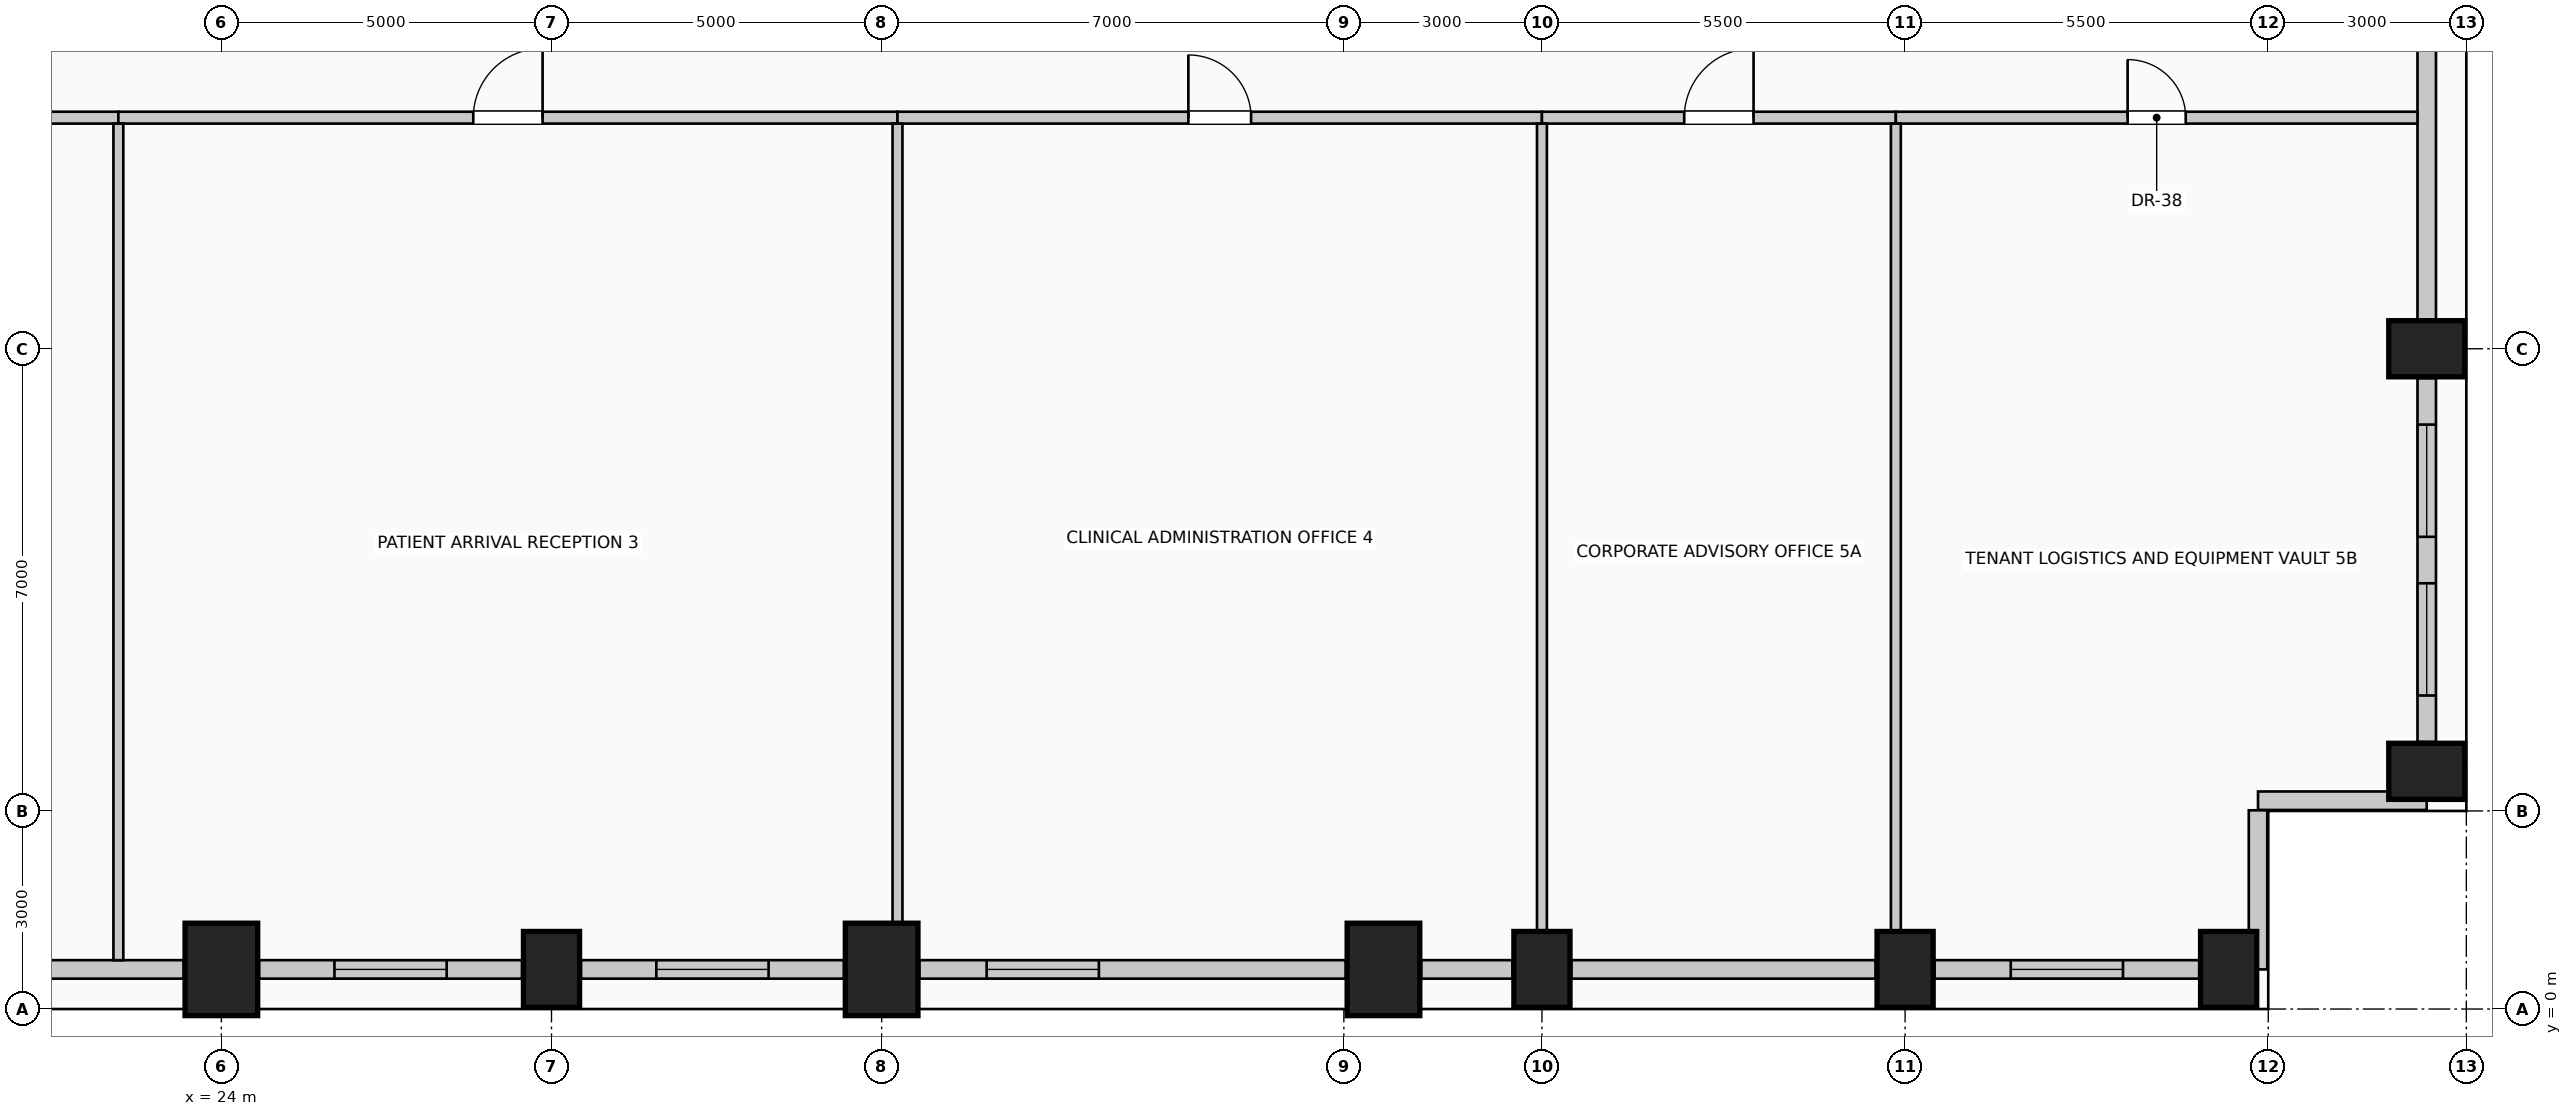
"""IFC4 building model, lengths in metres.
Left out: names, types, materials, properties, quantities, classifications, styles, units other than length and angle.
Written with IfcOpenShell. Run it as: python <this file> out.ifc"""

import sys

from ifc_helpers import new_model, si_unit, direction, frame, frame_2d, origin, origin_2d, place, context, subcontext, project, spatial, rectangle, extrude, element, fill, save


model = new_model("IFC4")
c1 = context("Model", 3, precision=1e-05, world=origin(), true_north=direction((0.0, 1.0)))
c2 = subcontext(c1, "Body", "Model", "MODEL_VIEW")
j1 = project(units=[si_unit("LENGTHUNIT", "METRE"), si_unit("PLANEANGLEUNIT", "RADIAN")], contexts=[c1])
p1 = place(None, origin())
s1 = spatial("IfcSite", under=j1, at=p1, CompositionType="ELEMENT")
p2 = place(p1, origin())
s2 = spatial("IfcBuilding", under=s1, at=p2, CompositionType="ELEMENT")
p3 = place(p2, frame((0.0, 0.0, 128.6)))
s3 = spatial("IfcBuildingStorey", under=s2, at=p3, CompositionType="ELEMENT", Elevation=128.6)
p4 = place(p3, frame((24.0, 0.6, 0.0), z_axis=(0.0, 0.0, 1.0), x_axis=(1.0, 0.0, 0.0)))
e1 = element("IfcColumn", 1, at=p4, inside=s3, PredefinedType="COLUMN", context=c2, shape_type="SweptSolid", body=[
    extrude(rectangle(XDim=1.1, YDim=1.4, at=origin_2d()), origin(), (0.0, 0.0, 1.0), 4.0),
])
p5 = place(p3, frame((29.0, 0.6, 0.0), z_axis=(0.0, 0.0, 1.0), x_axis=(1.0, 0.0, 0.0)))
e2 = element("IfcColumn", 2, at=p5, inside=s3, PredefinedType="COLUMN", context=c2, shape_type="SweptSolid", body=[
    extrude(rectangle(XDim=0.85, YDim=1.15, at=origin_2d()), origin(), (0.0, 0.0, 1.0), 4.0),
])
for number, where, z_axis, x_axis in (
    (3, (34.0, 0.6, 0.0), (0.0, 0.0, 1.0), (1.0, 0.0, 0.0)),
    (4, (41.6, 0.6, 0.0), (0.0, 0.0, 1.0), (1.0, 0.0, 0.0)),
):
    element("IfcColumn", number, at=place(p3, frame(where, z_axis=z_axis, x_axis=x_axis)), inside=s3, PredefinedType="COLUMN", context=c2, shape_type="SweptSolid", body=[
        extrude(rectangle(XDim=1.1, YDim=1.4, at=origin_2d()), origin(), (0.0, 0.0, 1.0), 4.0),
    ])
for number, where, z_axis, x_axis in (
    (5, (44.0, 0.6, 0.0), (0.0, 0.0, 1.0), (1.0, 0.0, 0.0)),
    (6, (49.5, 0.6, 0.0), (0.0, 0.0, 1.0), (1.0, 0.0, 0.0)),
    (7, (54.4, 0.6, 0.0), (0.0, 0.0, 1.0), (1.0, 0.0, 0.0)),
    (8, (57.4, 3.6, 0.0), (0.0, 0.0, 1.0), (0.0, 1.0, 0.0)),
    (9, (57.4, 10.0, 0.0), (0.0, 0.0, 1.0), (0.0, 1.0, 0.0)),
):
    element("IfcColumn", number, at=place(p3, frame(where, z_axis=z_axis, x_axis=x_axis)), inside=s3, PredefinedType="COLUMN", context=c2, shape_type="SweptSolid", body=[
        extrude(rectangle(XDim=0.85, YDim=1.15, at=origin_2d()), origin(), (0.0, 0.0, 1.0), 4.0),
    ])
p6 = place(p3, frame((23.43, 0.6, 0.0), z_axis=(0.0, 0.0, 1.0), x_axis=(-1.0, 0.0, 0.0)))
e10 = element("IfcWall", 10, at=p6, inside=s3, PredefinedType="SOLIDWALL", context=c2, shape_type="SweptSolid", body=[
    extrude(rectangle(XDim=6.46, YDim=0.28, at=frame_2d((3.23, 0.0))), origin(), (0.0, 0.0, 1.0), 2.875),
])
p7 = place(p6, frame((3.74, 0.0, 0.5)))
e11 = element("IfcOpeningElement", 11, at=p7, cuts=e10, PredefinedType="OPENING", context=c2, shape_type="SweptSolid", body=[
    extrude(rectangle(XDim=1.7, YDim=1.95, at=frame_2d((0.85, 0.975))), frame((0.0, 0.15, 0.0), z_axis=(0.0, -1.0, 0.0), x_axis=(1.0, 0.0, 0.0)), (0.0, 0.0, 1.0), 0.3),
])
p8 = place(p3, frame((28.555, 0.6, 0.0), z_axis=(0.0, 0.0, 1.0), x_axis=(-1.0, 0.0, 0.0)))
e12 = element("IfcWall", 12, at=p8, inside=s3, PredefinedType="SOLIDWALL", context=c2, shape_type="SweptSolid", body=[
    extrude(rectangle(XDim=3.985, YDim=0.28, at=frame_2d((1.992, 0.0))), origin(), (0.0, 0.0, 1.0), 2.875),
])
p9 = place(p8, frame((1.143, 0.0, 0.5)))
e13 = element("IfcOpeningElement", 13, at=p9, cuts=e12, PredefinedType="OPENING", context=c2, shape_type="SweptSolid", body=[
    extrude(rectangle(XDim=1.7, YDim=1.95, at=frame_2d((0.85, 0.975))), frame((0.0, 0.15, 0.0), z_axis=(0.0, -1.0, 0.0), x_axis=(1.0, 0.0, 0.0)), (0.0, 0.0, 1.0), 0.3),
])
p10 = place(p3, frame((33.43, 0.6, 0.0), z_axis=(0.0, 0.0, 1.0), x_axis=(-1.0, 0.0, 0.0)))
e14 = element("IfcWall", 14, at=p10, inside=s3, PredefinedType="SOLIDWALL", context=c2, shape_type="SweptSolid", body=[
    extrude(rectangle(XDim=3.985, YDim=0.28, at=frame_2d((1.992, 0.0))), origin(), (0.0, 0.0, 1.0), 2.875),
])
p11 = place(p10, frame((1.143, 0.0, 0.5)))
e15 = element("IfcOpeningElement", 15, at=p11, cuts=e14, PredefinedType="OPENING", context=c2, shape_type="SweptSolid", body=[
    extrude(rectangle(XDim=1.7, YDim=1.95, at=frame_2d((0.85, 0.975))), frame((0.0, 0.15, 0.0), z_axis=(0.0, -1.0, 0.0), x_axis=(1.0, 0.0, 0.0)), (0.0, 0.0, 1.0), 0.3),
])
p12 = place(p3, frame((41.03, 0.6, 0.0), z_axis=(0.0, 0.0, 1.0), x_axis=(-1.0, 0.0, 0.0)))
e16 = element("IfcWall", 16, at=p12, inside=s3, PredefinedType="SOLIDWALL", context=c2, shape_type="SweptSolid", body=[
    extrude(rectangle(XDim=6.46, YDim=0.28, at=frame_2d((3.23, 0.0))), origin(), (0.0, 0.0, 1.0), 2.875),
])
p13 = place(p12, frame((3.74, 0.0, 0.5)))
e17 = element("IfcOpeningElement", 17, at=p13, cuts=e16, PredefinedType="OPENING", context=c2, shape_type="SweptSolid", body=[
    extrude(rectangle(XDim=1.7, YDim=1.95, at=frame_2d((0.85, 0.975))), frame((0.0, 0.15, 0.0), z_axis=(0.0, -1.0, 0.0), x_axis=(1.0, 0.0, 0.0)), (0.0, 0.0, 1.0), 0.3),
])
p14 = place(p3, frame((43.555, 0.6, 0.0), z_axis=(0.0, 0.0, 1.0), x_axis=(-1.0, 0.0, 0.0)))
e18 = element("IfcWall", 18, at=p14, inside=s3, PredefinedType="SOLIDWALL", context=c2, shape_type="SweptSolid", body=[
    extrude(rectangle(XDim=1.385, YDim=0.28, at=frame_2d((0.692, 0.0))), origin(), (0.0, 0.0, 1.0), 2.875),
])
p15 = place(p3, frame((49.055, 0.6, 0.0), z_axis=(0.0, 0.0, 1.0), x_axis=(-1.0, 0.0, 0.0)))
e19 = element("IfcWall", 19, at=p15, inside=s3, PredefinedType="SOLIDWALL", context=c2, shape_type="SweptSolid", body=[
    extrude(rectangle(XDim=4.61, YDim=0.28, at=frame_2d((2.305, 0.0))), origin(), (0.0, 0.0, 1.0), 2.875),
])
p16 = place(p3, frame((53.955, 0.6, 0.0), z_axis=(0.0, 0.0, 1.0), x_axis=(-1.0, 0.0, 0.0)))
e20 = element("IfcWall", 20, at=p16, inside=s3, PredefinedType="SOLIDWALL", context=c2, shape_type="SweptSolid", body=[
    extrude(rectangle(XDim=4.01, YDim=0.28, at=frame_2d((2.005, 0.0))), origin(), (0.0, 0.0, 1.0), 2.875),
])
p17 = place(p16, frame((1.155, 0.0, 0.5)))
e21 = element("IfcOpeningElement", 21, at=p17, cuts=e20, PredefinedType="OPENING", context=c2, shape_type="SweptSolid", body=[
    extrude(rectangle(XDim=1.7, YDim=1.95, at=frame_2d((0.85, 0.975))), frame((0.0, 0.15, 0.0), z_axis=(0.0, -1.0, 0.0), x_axis=(1.0, 0.0, 0.0)), (0.0, 0.0, 1.0), 0.3),
])
p18 = place(p3, frame((57.4, 9.555, 0.0), z_axis=(0.0, 0.0, 1.0), x_axis=(0.0, -1.0, 0.0)))
e22 = element("IfcWall", 22, at=p18, inside=s3, PredefinedType="SOLIDWALL", context=c2, shape_type="SweptSolid", body=[
    extrude(rectangle(XDim=5.51, YDim=0.28, at=frame_2d((2.755, 0.0))), origin(), (0.0, 0.0, 1.0), 2.875),
])
p19 = place(p18, frame((0.703, 0.0, 0.5)))
e23 = element("IfcOpeningElement", 23, at=p19, cuts=e22, PredefinedType="OPENING", context=c2, shape_type="SweptSolid", body=[
    extrude(rectangle(XDim=1.7, YDim=1.95, at=frame_2d((0.85, 0.975))), frame((0.0, 0.15, 0.0), z_axis=(0.0, -1.0, 0.0), x_axis=(1.0, 0.0, 0.0)), (0.0, 0.0, 1.0), 0.3),
])
p20 = place(p18, frame((3.107, 0.0, 0.5)))
e24 = element("IfcOpeningElement", 24, at=p20, cuts=e22, PredefinedType="OPENING", context=c2, shape_type="SweptSolid", body=[
    extrude(rectangle(XDim=1.7, YDim=1.95, at=frame_2d((0.85, 0.975))), frame((0.0, 0.15, 0.0), z_axis=(0.0, -1.0, 0.0), x_axis=(1.0, 0.0, 0.0)), (0.0, 0.0, 1.0), 0.3),
])
p21 = place(p3, frame((57.4, 17.555, 0.0), z_axis=(0.0, 0.0, 1.0), x_axis=(0.0, -1.0, 0.0)))
e25 = element("IfcWall", 25, at=p21, inside=s3, PredefinedType="SOLIDWALL", context=c2, shape_type="SweptSolid", body=[
    extrude(rectangle(XDim=7.11, YDim=0.28, at=frame_2d((3.555, 0.0))), origin(), (0.0, 0.0, 1.0), 2.875),
])
p22 = place(p3, frame((57.4, 3.155, 0.0), z_axis=(0.0, 0.0, 1.0), x_axis=(-1.0, 0.0, 0.0)))
e26 = element("IfcWall", 26, at=p22, inside=s3, PredefinedType="SOLIDWALL", context=c2, shape_type="SweptSolid", body=[
    extrude(rectangle(XDim=2.555, YDim=0.28, at=frame_2d((1.277, 0.0))), origin(), (0.0, 0.0, 1.0), 3.725),
])
p23 = place(p3, frame((54.845, 3.01, 0.0), z_axis=(0.0, 0.0, 1.0), x_axis=(0.0, -1.0, 0.0)))
e27 = element("IfcWall", 27, at=p23, inside=s3, PredefinedType="SOLIDWALL", context=c2, shape_type="SweptSolid", body=[
    extrude(rectangle(XDim=2.41, YDim=0.28, at=frame_2d((1.205, 0.0))), origin(), (0.0, 0.0, 1.0), 3.725),
])
p24 = place(p3, frame((15.36, 13.5, 0.0), z_axis=(0.0, 0.0, 1.0), x_axis=(1.0, 0.0, 0.0)))
e28 = element("IfcWall", 28, at=p24, inside=s3, PredefinedType="PARTITIONING", context=c2, shape_type="SweptSolid", body=[
    extrude(rectangle(XDim=7.08, YDim=0.18, at=frame_2d((3.54, 0.0))), origin(), (0.0, 0.0, 1.0), 3.725),
])
p25 = place(p24, frame((3.065, 0.0, 0.0)))
e29 = element("IfcOpeningElement", 29, at=p25, cuts=e28, PredefinedType="OPENING", context=c2, shape_type="SweptSolid", body=[
    extrude(rectangle(XDim=0.95, YDim=2.15, at=frame_2d((0.475, 1.075))), frame((0.0, 0.1, 0.0), z_axis=(0.0, -1.0, 0.0), x_axis=(1.0, 0.0, 0.0)), (0.0, 0.0, 1.0), 0.2),
])
p26 = place(p3, frame((22.44, 13.5, 0.0), z_axis=(0.0, 0.0, 1.0), x_axis=(1.0, 0.0, 0.0)))
e30 = element("IfcWall", 30, at=p26, inside=s3, PredefinedType="PARTITIONING", context=c2, shape_type="SweptSolid", body=[
    extrude(rectangle(XDim=11.8, YDim=0.18, at=frame_2d((5.9, 0.0))), origin(), (0.0, 0.0, 1.0), 3.725),
])
p27 = place(p26, frame((5.375, 0.0, 0.0)))
e31 = element("IfcOpeningElement", 31, at=p27, cuts=e30, PredefinedType="OPENING", context=c2, shape_type="SweptSolid", body=[
    extrude(rectangle(XDim=1.05, YDim=2.15, at=frame_2d((0.525, 1.075))), frame((0.0, 0.1, 0.0), z_axis=(0.0, -1.0, 0.0), x_axis=(1.0, 0.0, 0.0)), (0.0, 0.0, 1.0), 0.2),
])
p28 = place(p3, frame((34.24, 13.5, 0.0), z_axis=(0.0, 0.0, 1.0), x_axis=(1.0, 0.0, 0.0)))
e32 = element("IfcWall", 32, at=p28, inside=s3, PredefinedType="PARTITIONING", context=c2, shape_type="SweptSolid", body=[
    extrude(rectangle(XDim=9.76, YDim=0.18, at=frame_2d((4.88, 0.0))), origin(), (0.0, 0.0, 1.0), 3.725),
])
p29 = place(p28, frame((4.405, 0.0, 0.0)))
e33 = element("IfcOpeningElement", 33, at=p29, cuts=e32, PredefinedType="OPENING", context=c2, shape_type="SweptSolid", body=[
    extrude(rectangle(XDim=0.95, YDim=2.15, at=frame_2d((0.475, 1.075))), frame((0.0, 0.1, 0.0), z_axis=(0.0, -1.0, 0.0), x_axis=(1.0, 0.0, 0.0)), (0.0, 0.0, 1.0), 0.2),
])
p30 = place(p3, frame((44.0, 13.5, 0.0), z_axis=(0.0, 0.0, 1.0), x_axis=(1.0, 0.0, 0.0)))
e34 = element("IfcWall", 34, at=p30, inside=s3, PredefinedType="PARTITIONING", context=c2, shape_type="SweptSolid", body=[
    extrude(rectangle(XDim=5.36, YDim=0.18, at=frame_2d((2.68, 0.0))), origin(), (0.0, 0.0, 1.0), 3.725),
])
p31 = place(p30, frame((2.155, 0.0, 0.0)))
e35 = element("IfcOpeningElement", 35, at=p31, cuts=e34, PredefinedType="OPENING", context=c2, shape_type="SweptSolid", body=[
    extrude(rectangle(XDim=1.05, YDim=2.15, at=frame_2d((0.525, 1.075))), frame((0.0, 0.1, 0.0), z_axis=(0.0, -1.0, 0.0), x_axis=(1.0, 0.0, 0.0)), (0.0, 0.0, 1.0), 0.2),
])
p32 = place(p3, frame((49.36, 13.5, 0.0), z_axis=(0.0, 0.0, 1.0), x_axis=(1.0, 0.0, 0.0)))
e36 = element("IfcWall", 36, at=p32, inside=s3, PredefinedType="PARTITIONING", context=c2, shape_type="SweptSolid", body=[
    extrude(rectangle(XDim=7.9, YDim=0.18, at=frame_2d((3.95, 0.0))), origin(), (0.0, 0.0, 1.0), 3.725),
])
p33 = place(p32, frame((3.51, 0.0, 0.0)))
e37 = element("IfcOpeningElement", 37, at=p33, cuts=e36, PredefinedType="OPENING", context=c2, shape_type="SweptSolid", body=[
    extrude(rectangle(XDim=0.88, YDim=2.1, at=frame_2d((0.44, 1.05))), frame((0.0, 0.1, 0.0), z_axis=(0.0, -1.0, 0.0), x_axis=(1.0, 0.0, 0.0)), (0.0, 0.0, 1.0), 0.2),
])
p34 = place(p3, frame((22.44, 0.74, 0.0), z_axis=(0.0, 0.0, 1.0), x_axis=(0.0, 1.0, 0.0)))
e38 = element("IfcWall", 38, at=p34, inside=s3, PredefinedType="PARTITIONING", context=c2, shape_type="SweptSolid", body=[
    extrude(rectangle(XDim=12.67, YDim=0.15, at=frame_2d((6.335, 0.0))), origin(), (0.0, 0.0, 1.0), 3.725),
])
p35 = place(p3, frame((34.24, 1.3, 0.0), z_axis=(0.0, 0.0, 1.0), x_axis=(0.0, 1.0, 0.0)))
e39 = element("IfcWall", 39, at=p35, inside=s3, PredefinedType="PARTITIONING", context=c2, shape_type="SweptSolid", body=[
    extrude(rectangle(XDim=12.11, YDim=0.15, at=frame_2d((6.055, 0.0))), origin(), (0.0, 0.0, 1.0), 3.725),
])
for number, where, z_axis, x_axis in (
    (40, (44.0, 1.175, 0.0), (0.0, 0.0, 1.0), (0.0, 1.0, 0.0)),
    (41, (49.36, 1.175, 0.0), (0.0, 0.0, 1.0), (0.0, 1.0, 0.0)),
):
    element("IfcWall", number, at=place(p3, frame(where, z_axis=z_axis, x_axis=x_axis)), inside=s3, PredefinedType="PARTITIONING", context=c2, shape_type="SweptSolid", body=[
        extrude(rectangle(XDim=12.235, YDim=0.15, at=frame_2d((6.117, 0.0))), origin(), (0.0, 0.0, 1.0), 3.725),
    ])
p36 = place(p9, origin())
e42 = element("IfcWindow", 42, at=p36, inside=s3, PartitioningType="SINGLE_PANEL", PredefinedType="WINDOW", context=c2, shape_type="SweptSolid", body=[
    extrude(rectangle(XDim=1.7, YDim=1.95, at=frame_2d((0.85, 0.975))), frame((0.0, 0.03, 0.0), z_axis=(0.0, -1.0, 0.0), x_axis=(1.0, 0.0, 0.0)), (0.0, 0.0, 1.0), 0.06),
])
fill(e13, e42)
p37 = place(p11, origin())
e43 = element("IfcWindow", 43, at=p37, inside=s3, PartitioningType="SINGLE_PANEL", PredefinedType="WINDOW", context=c2, shape_type="SweptSolid", body=[
    extrude(rectangle(XDim=1.7, YDim=1.95, at=frame_2d((0.85, 0.975))), frame((0.0, 0.03, 0.0), z_axis=(0.0, -1.0, 0.0), x_axis=(1.0, 0.0, 0.0)), (0.0, 0.0, 1.0), 0.06),
])
fill(e15, e43)
p38 = place(p13, origin())
e44 = element("IfcWindow", 44, at=p38, inside=s3, PartitioningType="SINGLE_PANEL", PredefinedType="WINDOW", context=c2, shape_type="SweptSolid", body=[
    extrude(rectangle(XDim=1.7, YDim=1.95, at=frame_2d((0.85, 0.975))), frame((0.0, 0.03, 0.0), z_axis=(0.0, -1.0, 0.0), x_axis=(1.0, 0.0, 0.0)), (0.0, 0.0, 1.0), 0.06),
])
fill(e17, e44)
p39 = place(p17, origin())
e45 = element("IfcWindow", 45, at=p39, inside=s3, PartitioningType="SINGLE_PANEL", PredefinedType="WINDOW", context=c2, shape_type="SweptSolid", body=[
    extrude(rectangle(XDim=1.7, YDim=1.95, at=frame_2d((0.85, 0.975))), frame((0.0, 0.03, 0.0), z_axis=(0.0, -1.0, 0.0), x_axis=(1.0, 0.0, 0.0)), (0.0, 0.0, 1.0), 0.06),
])
fill(e21, e45)
p40 = place(p19, origin())
e46 = element("IfcWindow", 46, at=p40, inside=s3, PartitioningType="SINGLE_PANEL", PredefinedType="WINDOW", context=c2, shape_type="SweptSolid", body=[
    extrude(rectangle(XDim=1.7, YDim=1.95, at=frame_2d((0.85, 0.975))), frame((0.0, 0.03, 0.0), z_axis=(0.0, -1.0, 0.0), x_axis=(1.0, 0.0, 0.0)), (0.0, 0.0, 1.0), 0.06),
])
fill(e23, e46)
p41 = place(p20, origin())
e47 = element("IfcWindow", 47, at=p41, inside=s3, PartitioningType="SINGLE_PANEL", PredefinedType="WINDOW", context=c2, shape_type="SweptSolid", body=[
    extrude(rectangle(XDim=1.7, YDim=1.95, at=frame_2d((0.85, 0.975))), frame((0.0, 0.03, 0.0), z_axis=(0.0, -1.0, 0.0), x_axis=(1.0, 0.0, 0.0)), (0.0, 0.0, 1.0), 0.06),
])
fill(e24, e47)
p42 = place(p27, origin())
e48 = element("IfcDoor", 48, at=p42, inside=s3, OperationType="SINGLE_SWING_RIGHT", PredefinedType="DOOR", context=c2, shape_type="SweptSolid", body=[
    extrude(rectangle(XDim=1.05, YDim=2.15, at=frame_2d((0.525, 1.075))), frame((0.0, 0.025, 0.0), z_axis=(0.0, -1.0, 0.0), x_axis=(1.0, 0.0, 0.0)), (0.0, 0.0, 1.0), 0.05),
])
fill(e31, e48)
p43 = place(p29, origin())
e49 = element("IfcDoor", 49, at=p43, inside=s3, OperationType="SINGLE_SWING_LEFT", PredefinedType="DOOR", context=c2, shape_type="SweptSolid", body=[
    extrude(rectangle(XDim=0.95, YDim=2.15, at=frame_2d((0.475, 1.075))), frame((0.0, 0.025, 0.0), z_axis=(0.0, -1.0, 0.0), x_axis=(1.0, 0.0, 0.0)), (0.0, 0.0, 1.0), 0.05),
])
fill(e33, e49)
p44 = place(p31, origin())
e50 = element("IfcDoor", 50, at=p44, inside=s3, OperationType="SINGLE_SWING_RIGHT", PredefinedType="DOOR", context=c2, shape_type="SweptSolid", body=[
    extrude(rectangle(XDim=1.05, YDim=2.15, at=frame_2d((0.525, 1.075))), frame((0.0, 0.025, 0.0), z_axis=(0.0, -1.0, 0.0), x_axis=(1.0, 0.0, 0.0)), (0.0, 0.0, 1.0), 0.05),
])
fill(e35, e50)
p45 = place(p33, origin())
e51 = element("IfcDoor", 51, at=p45, inside=s3, OperationType="SINGLE_SWING_LEFT", PredefinedType="DOOR", context=c2, shape_type="SweptSolid", body=[
    extrude(rectangle(XDim=0.88, YDim=2.1, at=frame_2d((0.44, 1.05))), frame((0.0, 0.025, 0.0), z_axis=(0.0, -1.0, 0.0), x_axis=(1.0, 0.0, 0.0)), (0.0, 0.0, 1.0), 0.05),
])
fill(e37, e51)
save(model, sys.argv[1])
